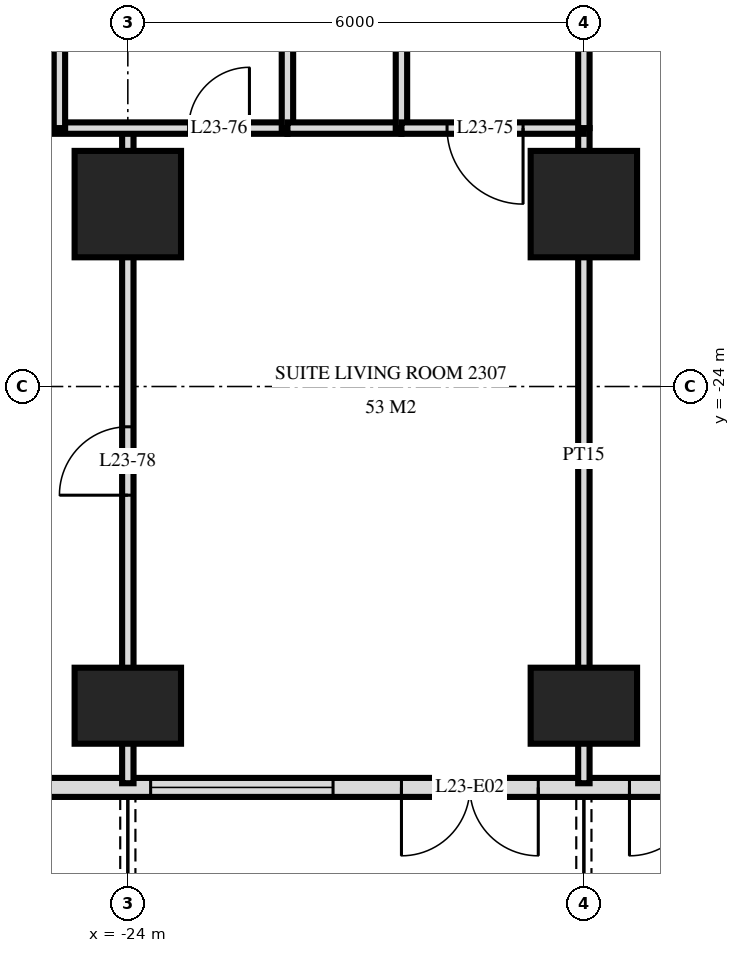
"""IFC4 building model, lengths in metres.
Left out: names, types, materials, properties, quantities, classifications, styles, units other than length and angle.
Written with IfcOpenShell. Run it as: python <this file> out.ifc"""

import sys

from ifc_helpers import new_model, si_unit, direction, frame, frame_2d, origin, origin_2d, place, context, subcontext, project, spatial, rectangle, extrude, element, fill, save


model = new_model("IFC4")
c1 = context("Model", 3, precision=1e-05, world=origin(), true_north=direction((0.0, 1.0)))
c2 = subcontext(c1, "Body", "Model", "MODEL_VIEW")
j1 = project(units=[si_unit("LENGTHUNIT", "METRE"), si_unit("PLANEANGLEUNIT", "RADIAN")], contexts=[c1])
p1 = place(None, origin())
s1 = spatial("IfcSite", under=j1, at=p1, CompositionType="ELEMENT")
p2 = place(p1, origin())
s2 = spatial("IfcBuilding", under=s1, at=p2, CompositionType="ELEMENT")
p3 = place(p2, frame((0.0, 0.0, 92.4)))
s3 = spatial("IfcBuildingStorey", under=s2, at=p3, CompositionType="ELEMENT", Elevation=92.4)
p4 = place(p3, frame((-24.0, -28.2, 0.0), z_axis=(0.0, 0.0, 1.0), x_axis=(1.0, 0.0, 0.0)))
e1 = element("IfcColumn", 1, at=p4, inside=s3, PredefinedType="COLUMN", context=c2, shape_type="SweptSolid", body=[
    extrude(rectangle(XDim=1.4, YDim=1.0, at=origin_2d()), origin(), (0.0, 0.0, 1.0), 3.6),
])
p5 = place(p3, frame((-24.0, -21.6, 0.0), z_axis=(0.0, 0.0, 1.0), x_axis=(1.0, 0.0, 0.0)))
e2 = element("IfcColumn", 2, at=p5, inside=s3, PredefinedType="COLUMN", context=c2, shape_type="SweptSolid", body=[
    extrude(rectangle(XDim=1.4, YDim=1.4, at=origin_2d()), origin(), (0.0, 0.0, 1.0), 3.6),
])
p6 = place(p3, frame((-18.0, -28.2, 0.0), z_axis=(0.0, 0.0, 1.0), x_axis=(1.0, 0.0, 0.0)))
e3 = element("IfcColumn", 3, at=p6, inside=s3, PredefinedType="COLUMN", context=c2, shape_type="SweptSolid", body=[
    extrude(rectangle(XDim=1.4, YDim=1.0, at=origin_2d()), origin(), (0.0, 0.0, 1.0), 3.6),
])
p7 = place(p3, frame((-18.0, -21.6, 0.0), z_axis=(0.0, 0.0, 1.0), x_axis=(1.0, 0.0, 0.0)))
e4 = element("IfcColumn", 4, at=p7, inside=s3, PredefinedType="COLUMN", context=c2, shape_type="SweptSolid", body=[
    extrude(rectangle(XDim=1.4, YDim=1.4, at=origin_2d()), origin(), (0.0, 0.0, 1.0), 3.6),
])
p8 = place(p3, frame((-28.775, -29.275, 0.0), z_axis=(0.0, 0.0, 1.0), x_axis=(1.0, 0.0, 0.0)))
e5 = element("IfcWall", 5, at=p8, inside=s3, PredefinedType="SOLIDWALL", context=c2, shape_type="SweptSolid", body=[
    extrude(rectangle(XDim=57.551, YDim=0.25, at=frame_2d((28.775, 0.0))), origin(), (0.0, 0.0, 1.0), 3.32),
])
p9 = place(p8, frame((0.575, 0.0, 0.0)))
e6 = element("IfcOpeningElement", 6, at=p9, cuts=e5, PredefinedType="OPENING", context=c2, shape_type="SweptSolid", body=[
    extrude(rectangle(XDim=1.8, YDim=2.4, at=frame_2d((0.9, 1.2))), frame((0.0, 0.135, 0.0), z_axis=(0.0, -1.0, 0.0), x_axis=(1.0, 0.0, 0.0)), (0.0, 0.0, 1.0), 0.27),
])
p10 = place(p8, frame((5.075, 0.0, 0.3)))
e7 = element("IfcOpeningElement", 7, at=p10, cuts=e5, PredefinedType="OPENING", context=c2, shape_type="SweptSolid", body=[
    extrude(rectangle(XDim=2.4, YDim=2.1, at=frame_2d((1.2, 1.05))), frame((0.0, 0.135, 0.0), z_axis=(0.0, -1.0, 0.0), x_axis=(1.0, 0.0, 0.0)), (0.0, 0.0, 1.0), 0.27),
])
p11 = place(p8, frame((8.375, 0.0, 0.0)))
e8 = element("IfcOpeningElement", 8, at=p11, cuts=e5, PredefinedType="OPENING", context=c2, shape_type="SweptSolid", body=[
    extrude(rectangle(XDim=1.8, YDim=2.4, at=frame_2d((0.9, 1.2))), frame((0.0, 0.135, 0.0), z_axis=(0.0, -1.0, 0.0), x_axis=(1.0, 0.0, 0.0)), (0.0, 0.0, 1.0), 0.27),
])
p12 = place(p8, frame((11.375, 0.0, 0.0)))
e9 = element("IfcOpeningElement", 9, at=p12, cuts=e5, PredefinedType="OPENING", context=c2, shape_type="SweptSolid", body=[
    extrude(rectangle(XDim=1.8, YDim=2.4, at=frame_2d((0.9, 1.2))), frame((0.0, 0.135, 0.0), z_axis=(0.0, -1.0, 0.0), x_axis=(1.0, 0.0, 0.0)), (0.0, 0.0, 1.0), 0.27),
])
p13 = place(p8, frame((14.075, 0.0, 0.3)))
e10 = element("IfcOpeningElement", 10, at=p13, cuts=e5, PredefinedType="OPENING", context=c2, shape_type="SweptSolid", body=[
    extrude(rectangle(XDim=2.4, YDim=2.1, at=frame_2d((1.2, 1.05))), frame((0.0, 0.135, 0.0), z_axis=(0.0, -1.0, 0.0), x_axis=(1.0, 0.0, 0.0)), (0.0, 0.0, 1.0), 0.27),
])
p14 = place(p8, frame((17.375, 0.0, 0.0)))
e11 = element("IfcOpeningElement", 11, at=p14, cuts=e5, PredefinedType="OPENING", context=c2, shape_type="SweptSolid", body=[
    extrude(rectangle(XDim=1.8, YDim=2.4, at=frame_2d((0.9, 1.2))), frame((0.0, 0.135, 0.0), z_axis=(0.0, -1.0, 0.0), x_axis=(1.0, 0.0, 0.0)), (0.0, 0.0, 1.0), 0.27),
])
p15 = place(p8, frame((20.075, 0.0, 0.3)))
e12 = element("IfcOpeningElement", 12, at=p15, cuts=e5, PredefinedType="OPENING", context=c2, shape_type="SweptSolid", body=[
    extrude(rectangle(XDim=2.4, YDim=2.1, at=frame_2d((1.2, 1.05))), frame((0.0, 0.135, 0.0), z_axis=(0.0, -1.0, 0.0), x_axis=(1.0, 0.0, 0.0)), (0.0, 0.0, 1.0), 0.27),
])
p16 = place(p8, frame((23.075, 0.0, 0.3)))
e13 = element("IfcOpeningElement", 13, at=p16, cuts=e5, PredefinedType="OPENING", context=c2, shape_type="SweptSolid", body=[
    extrude(rectangle(XDim=2.4, YDim=2.1, at=frame_2d((1.2, 1.05))), frame((0.0, 0.135, 0.0), z_axis=(0.0, -1.0, 0.0), x_axis=(1.0, 0.0, 0.0)), (0.0, 0.0, 1.0), 0.27),
])
p17 = place(p8, frame((26.375, 0.0, 0.0)))
e14 = element("IfcOpeningElement", 14, at=p17, cuts=e5, PredefinedType="OPENING", context=c2, shape_type="SweptSolid", body=[
    extrude(rectangle(XDim=1.8, YDim=2.4, at=frame_2d((0.9, 1.2))), frame((0.0, 0.135, 0.0), z_axis=(0.0, -1.0, 0.0), x_axis=(1.0, 0.0, 0.0)), (0.0, 0.0, 1.0), 0.27),
])
p18 = place(p8, frame((29.375, 0.0, 0.0)))
e15 = element("IfcOpeningElement", 15, at=p18, cuts=e5, PredefinedType="OPENING", context=c2, shape_type="SweptSolid", body=[
    extrude(rectangle(XDim=1.8, YDim=2.4, at=frame_2d((0.9, 1.2))), frame((0.0, 0.135, 0.0), z_axis=(0.0, -1.0, 0.0), x_axis=(1.0, 0.0, 0.0)), (0.0, 0.0, 1.0), 0.27),
])
p19 = place(p8, frame((32.075, 0.0, 0.3)))
e16 = element("IfcOpeningElement", 16, at=p19, cuts=e5, PredefinedType="OPENING", context=c2, shape_type="SweptSolid", body=[
    extrude(rectangle(XDim=2.4, YDim=2.1, at=frame_2d((1.2, 1.05))), frame((0.0, 0.135, 0.0), z_axis=(0.0, -1.0, 0.0), x_axis=(1.0, 0.0, 0.0)), (0.0, 0.0, 1.0), 0.27),
])
p20 = place(p8, frame((35.375, 0.0, 0.0)))
e17 = element("IfcOpeningElement", 17, at=p20, cuts=e5, PredefinedType="OPENING", context=c2, shape_type="SweptSolid", body=[
    extrude(rectangle(XDim=1.8, YDim=2.4, at=frame_2d((0.9, 1.2))), frame((0.0, 0.135, 0.0), z_axis=(0.0, -1.0, 0.0), x_axis=(1.0, 0.0, 0.0)), (0.0, 0.0, 1.0), 0.27),
])
p21 = place(p8, frame((38.075, 0.0, 0.3)))
e18 = element("IfcOpeningElement", 18, at=p21, cuts=e5, PredefinedType="OPENING", context=c2, shape_type="SweptSolid", body=[
    extrude(rectangle(XDim=2.4, YDim=2.1, at=frame_2d((1.2, 1.05))), frame((0.0, 0.135, 0.0), z_axis=(0.0, -1.0, 0.0), x_axis=(1.0, 0.0, 0.0)), (0.0, 0.0, 1.0), 0.27),
])
p22 = place(p8, frame((41.075, 0.0, 0.3)))
e19 = element("IfcOpeningElement", 19, at=p22, cuts=e5, PredefinedType="OPENING", context=c2, shape_type="SweptSolid", body=[
    extrude(rectangle(XDim=2.4, YDim=2.1, at=frame_2d((1.2, 1.05))), frame((0.0, 0.135, 0.0), z_axis=(0.0, -1.0, 0.0), x_axis=(1.0, 0.0, 0.0)), (0.0, 0.0, 1.0), 0.27),
])
p23 = place(p8, frame((44.375, 0.0, 0.0)))
e20 = element("IfcOpeningElement", 20, at=p23, cuts=e5, PredefinedType="OPENING", context=c2, shape_type="SweptSolid", body=[
    extrude(rectangle(XDim=1.8, YDim=2.4, at=frame_2d((0.9, 1.2))), frame((0.0, 0.135, 0.0), z_axis=(0.0, -1.0, 0.0), x_axis=(1.0, 0.0, 0.0)), (0.0, 0.0, 1.0), 0.27),
])
p24 = place(p8, frame((47.075, 0.0, 0.3)))
e21 = element("IfcOpeningElement", 21, at=p24, cuts=e5, PredefinedType="OPENING", context=c2, shape_type="SweptSolid", body=[
    extrude(rectangle(XDim=2.4, YDim=2.1, at=frame_2d((1.2, 1.05))), frame((0.0, 0.135, 0.0), z_axis=(0.0, -1.0, 0.0), x_axis=(1.0, 0.0, 0.0)), (0.0, 0.0, 1.0), 0.27),
])
p25 = place(p8, frame((50.375, 0.0, 0.0)))
e22 = element("IfcOpeningElement", 22, at=p25, cuts=e5, PredefinedType="OPENING", context=c2, shape_type="SweptSolid", body=[
    extrude(rectangle(XDim=1.8, YDim=2.4, at=frame_2d((0.9, 1.2))), frame((0.0, 0.135, 0.0), z_axis=(0.0, -1.0, 0.0), x_axis=(1.0, 0.0, 0.0)), (0.0, 0.0, 1.0), 0.27),
])
p26 = place(p8, frame((53.375, 0.0, 0.0)))
e23 = element("IfcOpeningElement", 23, at=p26, cuts=e5, PredefinedType="OPENING", context=c2, shape_type="SweptSolid", body=[
    extrude(rectangle(XDim=1.8, YDim=2.4, at=frame_2d((0.9, 1.2))), frame((0.0, 0.135, 0.0), z_axis=(0.0, -1.0, 0.0), x_axis=(1.0, 0.0, 0.0)), (0.0, 0.0, 1.0), 0.27),
])
p27 = place(p3, frame((-18.0, -20.6, 0.0), z_axis=(0.0, 0.0, 1.0), x_axis=(0.0, 1.0, 0.0)))
e24 = element("IfcWall", 24, at=p27, inside=s3, PredefinedType="PARTITIONING", context=c2, shape_type="SweptSolid", body=[
    extrude(rectangle(XDim=3.6, YDim=0.15, at=frame_2d((1.8, 0.0))), origin(), (0.0, 0.0, 1.0), 3.32),
])
p28 = place(p3, frame((-18.0, -29.22, 0.0), z_axis=(0.0, 0.0, 1.0), x_axis=(0.0, 1.0, 0.0)))
e25 = element("IfcWall", 25, at=p28, inside=s3, PredefinedType="PARTITIONING", context=c2, shape_type="SweptSolid", body=[
    extrude(rectangle(XDim=8.62, YDim=0.15, at=frame_2d((4.31, 0.0))), origin(), (0.0, 0.0, 1.0), 3.32),
])
p29 = place(p3, frame((-20.4, -20.6, 0.0), z_axis=(0.0, 0.0, 1.0), x_axis=(0.0, 1.0, 0.0)))
e26 = element("IfcWall", 26, at=p29, inside=s3, PredefinedType="PARTITIONING", context=c2, shape_type="SweptSolid", body=[
    extrude(rectangle(XDim=3.6, YDim=0.15, at=frame_2d((1.8, 0.0))), origin(), (0.0, 0.0, 1.0), 3.32),
])
p30 = place(p29, frame((1.3, 0.0, 0.0)))
e27 = element("IfcOpeningElement", 27, at=p30, cuts=e26, PredefinedType="OPENING", context=c2, shape_type="SweptSolid", body=[
    extrude(rectangle(XDim=1.0, YDim=2.1, at=frame_2d((0.5, 1.05))), frame((0.0, 0.085, 0.0), z_axis=(0.0, -1.0, 0.0), x_axis=(1.0, 0.0, 0.0)), (0.0, 0.0, 1.0), 0.17),
])
p31 = place(p3, frame((-21.9, -20.6, 0.0), z_axis=(0.0, 0.0, 1.0), x_axis=(0.0, 1.0, 0.0)))
e28 = element("IfcWall", 28, at=p31, inside=s3, PredefinedType="PLUMBINGWALL", context=c2, shape_type="SweptSolid", body=[
    extrude(rectangle(XDim=3.6, YDim=0.15, at=frame_2d((1.8, 0.0))), origin(), (0.0, 0.0, 1.0), 3.32),
])
p32 = place(p3, frame((-24.0, -29.22, 0.0), z_axis=(0.0, 0.0, 1.0), x_axis=(0.0, 1.0, 0.0)))
e29 = element("IfcWall", 29, at=p32, inside=s3, PredefinedType="PARTITIONING", context=c2, shape_type="SweptSolid", body=[
    extrude(rectangle(XDim=8.62, YDim=0.15, at=frame_2d((4.31, 0.0))), origin(), (0.0, 0.0, 1.0), 3.32),
])
p33 = place(p32, frame((3.79, 0.0, 0.0)))
e30 = element("IfcOpeningElement", 30, at=p33, cuts=e29, PredefinedType="OPENING", context=c2, shape_type="SweptSolid", body=[
    extrude(rectangle(XDim=0.9, YDim=2.1, at=frame_2d((0.45, 1.05))), frame((0.0, 0.085, 0.0), z_axis=(0.0, -1.0, 0.0), x_axis=(1.0, 0.0, 0.0)), (0.0, 0.0, 1.0), 0.17),
])
p34 = place(p3, frame((-24.9, -20.6, 0.0), z_axis=(0.0, 0.0, 1.0), x_axis=(0.0, 1.0, 0.0)))
e31 = element("IfcWall", 31, at=p34, inside=s3, PredefinedType="PARTITIONING", context=c2, shape_type="SweptSolid", body=[
    extrude(rectangle(XDim=3.6, YDim=0.15, at=frame_2d((1.8, 0.0))), origin(), (0.0, 0.0, 1.0), 3.32),
])
p35 = place(p3, frame((-20.4, -20.6, 0.0), z_axis=(0.0, 0.0, 1.0), x_axis=(1.0, 0.0, 0.0)))
e32 = element("IfcWall", 32, at=p35, inside=s3, PredefinedType="PARTITIONING", context=c2, shape_type="SweptSolid", body=[
    extrude(rectangle(XDim=2.4, YDim=0.15, at=frame_2d((1.2, 0.0))), origin(), (0.0, 0.0, 1.0), 3.32),
])
p36 = place(p35, frame((0.6, 0.0, 0.0)))
e33 = element("IfcOpeningElement", 33, at=p36, cuts=e32, PredefinedType="OPENING", context=c2, shape_type="SweptSolid", body=[
    extrude(rectangle(XDim=1.0, YDim=2.1, at=frame_2d((0.5, 1.05))), frame((0.0, 0.085, 0.0), z_axis=(0.0, -1.0, 0.0), x_axis=(1.0, 0.0, 0.0)), (0.0, 0.0, 1.0), 0.17),
])
p37 = place(p3, frame((-33.12, -20.6, 0.0), z_axis=(0.0, 0.0, 1.0), x_axis=(1.0, 0.0, 0.0)))
e34 = element("IfcWall", 34, at=p37, inside=s3, PredefinedType="PARTITIONING", context=c2, shape_type="SweptSolid", body=[
    extrude(rectangle(XDim=11.22, YDim=0.15, at=frame_2d((5.61, 0.0))), origin(), (0.0, 0.0, 1.0), 3.32),
])
p38 = place(p37, frame((9.92, 0.0, 0.0)))
e35 = element("IfcOpeningElement", 35, at=p38, cuts=e34, PredefinedType="OPENING", context=c2, shape_type="SweptSolid", body=[
    extrude(rectangle(XDim=0.8, YDim=2.1, at=frame_2d((0.4, 1.05))), frame((0.0, 0.085, 0.0), z_axis=(0.0, -1.0, 0.0), x_axis=(1.0, 0.0, 0.0)), (0.0, 0.0, 1.0), 0.17),
])
p39 = place(p37, frame((3.92, 0.0, 0.0)))
e36 = element("IfcOpeningElement", 36, at=p39, cuts=e34, PredefinedType="OPENING", context=c2, shape_type="SweptSolid", body=[
    extrude(rectangle(XDim=0.9, YDim=2.1, at=frame_2d((0.45, 1.05))), frame((0.0, 0.085, 0.0), z_axis=(0.0, -1.0, 0.0), x_axis=(1.0, 0.0, 0.0)), (0.0, 0.0, 1.0), 0.17),
])
p40 = place(p3, frame((-21.9, -20.6, 0.0), z_axis=(0.0, 0.0, 1.0), x_axis=(1.0, 0.0, 0.0)))
e37 = element("IfcWall", 37, at=p40, inside=s3, PredefinedType="PLUMBINGWALL", context=c2, shape_type="SweptSolid", body=[
    extrude(rectangle(XDim=1.5, YDim=0.15, at=frame_2d((0.75, 0.0))), origin(), (0.0, 0.0, 1.0), 3.32),
])
p41 = place(p10, origin())
e38 = element("IfcWindow", 38, at=p41, inside=s3, PartitioningType="SINGLE_PANEL", PredefinedType="WINDOW", context=c2, shape_type="SweptSolid", body=[
    extrude(rectangle(XDim=2.4, YDim=2.1, at=frame_2d((1.2, 1.05))), frame((0.0, 0.03, 0.0), z_axis=(0.0, -1.0, 0.0), x_axis=(1.0, 0.0, 0.0)), (0.0, 0.0, 1.0), 0.06),
])
fill(e7, e38)
p42 = place(p11, frame((0.9, 0.0, 0.0), z_axis=(0.0, 0.0, 1.0), x_axis=(-1.0, 0.0, 0.0)))
e39 = element("IfcDoor", 39, at=p42, inside=s3, OperationType="DOUBLE_DOOR_SINGLE_SWING", PredefinedType="DOOR", context=c2, shape_type="SweptSolid", body=[
    extrude(rectangle(XDim=1.8, YDim=2.4, at=frame_2d((0.0, 1.2))), frame((0.0, -0.025, 0.0), z_axis=(0.0, 1.0, 0.0), x_axis=(-1.0, 0.0, 0.0)), (0.0, 0.0, 1.0), 0.05),
])
fill(e8, e39)
p43 = place(p12, frame((0.9, 0.0, 0.0), z_axis=(0.0, 0.0, 1.0), x_axis=(-1.0, 0.0, 0.0)))
e40 = element("IfcDoor", 40, at=p43, inside=s3, OperationType="DOUBLE_DOOR_SINGLE_SWING", PredefinedType="DOOR", context=c2, shape_type="SweptSolid", body=[
    extrude(rectangle(XDim=1.8, YDim=2.4, at=frame_2d((0.0, 1.2))), frame((0.0, -0.025, 0.0), z_axis=(0.0, 1.0, 0.0), x_axis=(-1.0, 0.0, 0.0)), (0.0, 0.0, 1.0), 0.05),
])
fill(e9, e40)
p44 = place(p36, frame((0.5, 0.0, 0.0), z_axis=(0.0, 0.0, 1.0), x_axis=(-1.0, 0.0, 0.0)))
e41 = element("IfcDoor", 41, at=p44, inside=s3, OperationType="SINGLE_SWING_RIGHT", PredefinedType="DOOR", context=c2, shape_type="SweptSolid", body=[
    extrude(rectangle(XDim=1.0, YDim=2.1, at=frame_2d((0.0, 1.05))), frame((0.0, -0.025, 0.0), z_axis=(0.0, 1.0, 0.0), x_axis=(-1.0, 0.0, 0.0)), (0.0, 0.0, 1.0), 0.05),
])
fill(e33, e41)
p45 = place(p38, origin())
e42 = element("IfcDoor", 42, at=p45, inside=s3, OperationType="SINGLE_SWING_LEFT", PredefinedType="DOOR", context=c2, shape_type="SweptSolid", body=[
    extrude(rectangle(XDim=0.8, YDim=2.1, at=frame_2d((0.4, 1.05))), frame((0.0, 0.025, 0.0), z_axis=(0.0, -1.0, 0.0), x_axis=(1.0, 0.0, 0.0)), (0.0, 0.0, 1.0), 0.05),
])
fill(e35, e42)
p46 = place(p33, origin())
e43 = element("IfcDoor", 43, at=p46, inside=s3, OperationType="SINGLE_SWING_RIGHT", PredefinedType="DOOR", context=c2, shape_type="SweptSolid", body=[
    extrude(rectangle(XDim=0.9, YDim=2.1, at=frame_2d((0.45, 1.05))), frame((0.0, 0.025, 0.0), z_axis=(0.0, -1.0, 0.0), x_axis=(1.0, 0.0, 0.0)), (0.0, 0.0, 1.0), 0.05),
])
fill(e30, e43)
save(model, sys.argv[1])
